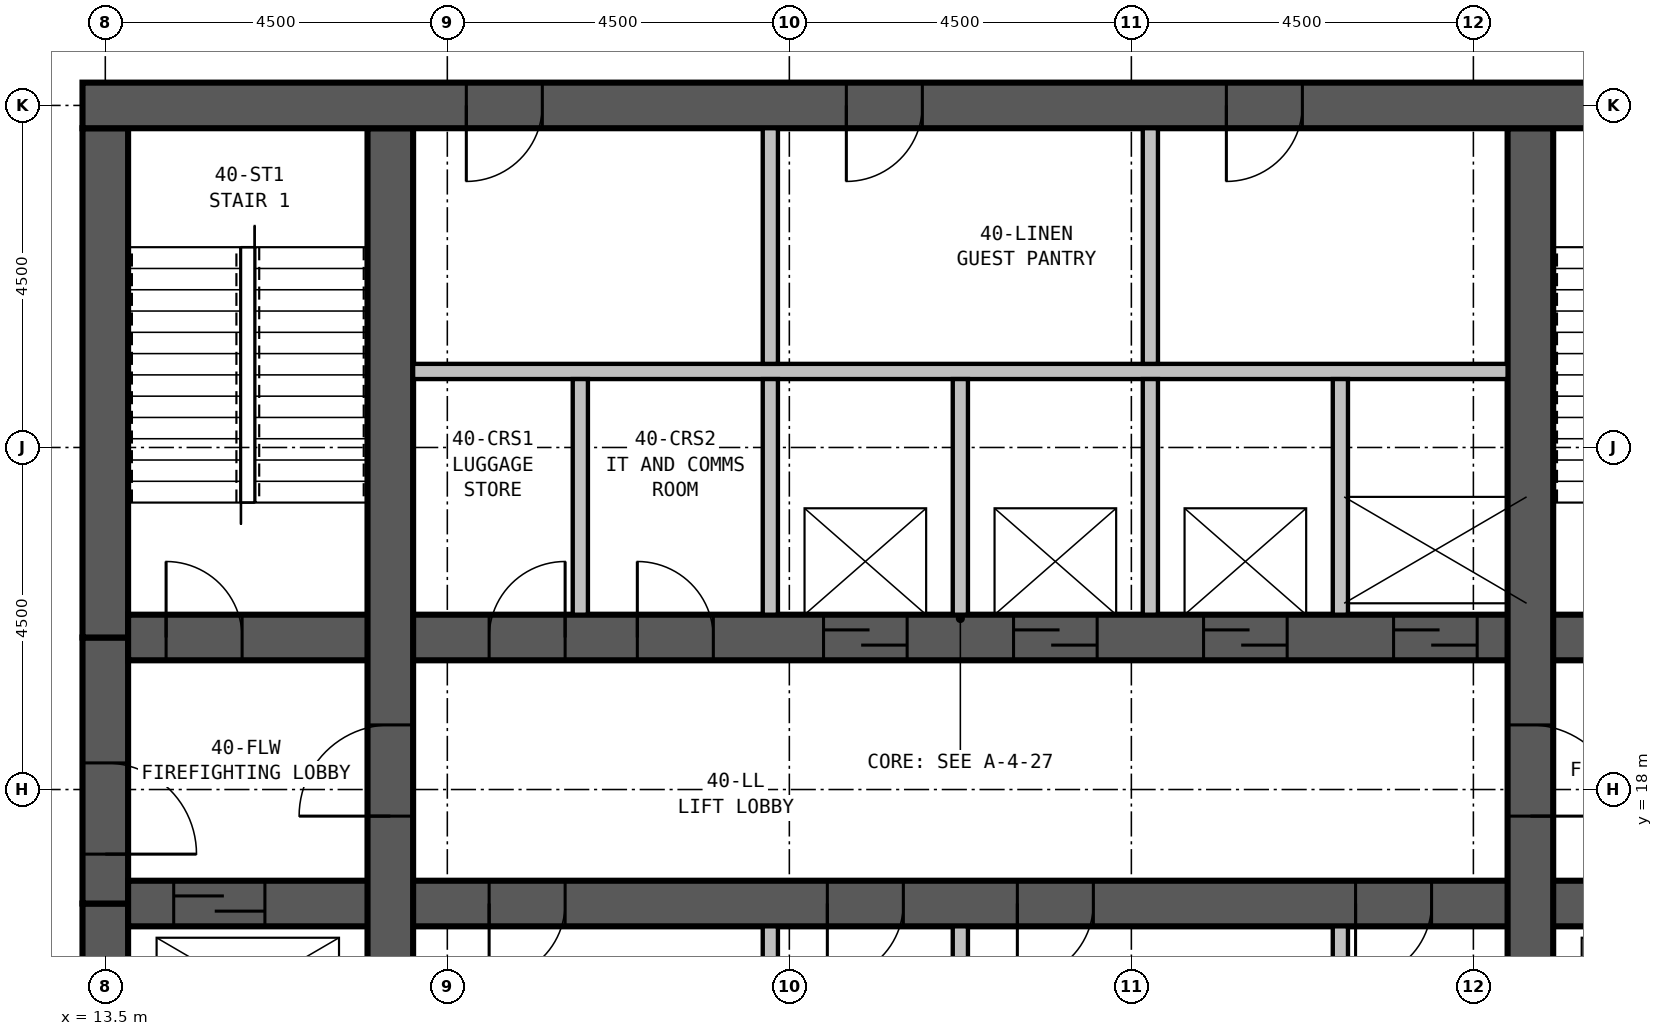
"""IFC4 building model, lengths in metres.
Left out: names, types, materials, properties, quantities, classifications, styles, units other than length and angle.
Written with IfcOpenShell. Run it as: python <this file> out.ifc"""

import sys

from ifc_helpers import new_model, si_unit, direction, frame, frame_2d, origin, place, context, subcontext, project, spatial, rectangle, extrude, element, fill, save


model = new_model("IFC4")
c1 = context("Model", 3, precision=1e-05, world=origin(), true_north=direction((0.0, 1.0)))
c2 = subcontext(c1, "Body", "Model", "MODEL_VIEW")
j1 = project(units=[si_unit("LENGTHUNIT", "METRE"), si_unit("PLANEANGLEUNIT", "RADIAN")], contexts=[c1])
p1 = place(None, origin())
s1 = spatial("IfcSite", under=j1, at=p1, CompositionType="ELEMENT")
p2 = place(p1, origin())
s2 = spatial("IfcBuilding", under=s1, at=p2, CompositionType="ELEMENT")
p3 = place(p2, frame((0.0, 0.0, 157.9)))
s3 = spatial("IfcBuildingStorey", under=s2, at=p3, CompositionType="ELEMENT", Elevation=157.9)
p4 = place(p3, frame((36.3, 27.0, 0.0), z_axis=(0.0, 0.0, 1.0), x_axis=(-1.0, 0.0, 0.0)))
e1 = element("IfcWall", 1, at=p4, inside=s3, PredefinedType="SHEAR", context=c2, shape_type="SweptSolid", body=[
    extrude(rectangle(XDim=23.1, YDim=0.6, at=frame_2d((11.55, 0.0))), origin(), (0.0, 0.0, 1.0), 4.5),
])
p5 = place(p4, frame((17.05, 0.0, 0.0)))
e2 = element("IfcOpeningElement", 2, at=p5, cuts=e1, PredefinedType="OPENING", context=c2, shape_type="SweptSolid", body=[
    extrude(rectangle(XDim=1.0, YDim=2.1, at=frame_2d((0.5, 1.05))), frame((0.0, 0.31, 0.0), z_axis=(0.0, -1.0, 0.0), x_axis=(1.0, 0.0, 0.0)), (0.0, 0.0, 1.0), 0.62),
])
p6 = place(p4, frame((12.05, 0.0, 0.0)))
e3 = element("IfcOpeningElement", 3, at=p6, cuts=e1, PredefinedType="OPENING", context=c2, shape_type="SweptSolid", body=[
    extrude(rectangle(XDim=1.0, YDim=2.1, at=frame_2d((0.5, 1.05))), frame((0.0, 0.31, 0.0), z_axis=(0.0, -1.0, 0.0), x_axis=(1.0, 0.0, 0.0)), (0.0, 0.0, 1.0), 0.62),
])
p7 = place(p4, frame((7.05, 0.0, 0.0)))
e4 = element("IfcOpeningElement", 4, at=p7, cuts=e1, PredefinedType="OPENING", context=c2, shape_type="SweptSolid", body=[
    extrude(rectangle(XDim=1.0, YDim=2.1, at=frame_2d((0.5, 1.05))), frame((0.0, 0.31, 0.0), z_axis=(0.0, -1.0, 0.0), x_axis=(1.0, 0.0, 0.0)), (0.0, 0.0, 1.0), 0.62),
])
p8 = place(p3, frame((17.25, 13.8, 0.0), z_axis=(0.0, 0.0, 1.0), x_axis=(0.0, 1.0, 0.0)))
e5 = element("IfcWall", 5, at=p8, inside=s3, PredefinedType="SHEAR", context=c2, shape_type="SweptSolid", body=[
    extrude(rectangle(XDim=12.9, YDim=0.6, at=frame_2d((6.45, 0.0))), origin(), (0.0, 0.0, 1.0), 4.5),
])
p9 = place(p8, frame((3.85, 0.0, 0.0)))
e6 = element("IfcOpeningElement", 6, at=p9, cuts=e5, PredefinedType="OPENING", context=c2, shape_type="SweptSolid", body=[
    extrude(rectangle(XDim=1.2, YDim=2.1, at=frame_2d((0.6, 1.05))), frame((0.0, 0.31, 0.0), z_axis=(0.0, -1.0, 0.0), x_axis=(1.0, 0.0, 0.0)), (0.0, 0.0, 1.0), 0.62),
])
p10 = place(p3, frame((32.25, 13.8, 0.0), z_axis=(0.0, 0.0, 1.0), x_axis=(0.0, 1.0, 0.0)))
e7 = element("IfcWall", 7, at=p10, inside=s3, PredefinedType="SHEAR", context=c2, shape_type="SweptSolid", body=[
    extrude(rectangle(XDim=12.9, YDim=0.6, at=frame_2d((6.45, 0.0))), origin(), (0.0, 0.0, 1.0), 4.5),
])
p11 = place(p10, frame((5.05, 0.0, 0.0), z_axis=(0.0, 0.0, 1.0), x_axis=(-1.0, 0.0, 0.0)))
e8 = element("IfcOpeningElement", 8, at=p11, cuts=e7, PredefinedType="OPENING", context=c2, shape_type="SweptSolid", body=[
    extrude(rectangle(XDim=1.2, YDim=2.1, at=frame_2d((0.6, 1.05))), frame((0.0, 0.31, 0.0), z_axis=(0.0, -1.0, 0.0), x_axis=(1.0, 0.0, 0.0)), (0.0, 0.0, 1.0), 0.62),
])
p12 = place(p3, frame((13.8, 16.5, 0.0), z_axis=(0.0, 0.0, 1.0), x_axis=(1.0, 0.0, 0.0)))
e9 = element("IfcWall", 9, at=p12, inside=s3, PredefinedType="SHEAR", context=c2, shape_type="SweptSolid", body=[
    extrude(rectangle(XDim=21.9, YDim=0.6, at=frame_2d((10.95, 0.0))), origin(), (0.0, 0.0, 1.0), 4.5),
])
p13 = place(p12, frame((5.75, 0.0, 0.0), z_axis=(0.0, 0.0, 1.0), x_axis=(-1.0, 0.0, 0.0)))
e10 = element("IfcOpeningElement", 10, at=p13, cuts=e9, PredefinedType="OPENING", context=c2, shape_type="SweptSolid", body=[
    extrude(rectangle(XDim=1.0, YDim=2.1, at=frame_2d((0.5, 1.05))), frame((0.0, 0.31, 0.0), z_axis=(0.0, -1.0, 0.0), x_axis=(1.0, 0.0, 0.0)), (0.0, 0.0, 1.0), 0.62),
])
p14 = place(p12, frame((10.2, 0.0, 0.0), z_axis=(0.0, 0.0, 1.0), x_axis=(-1.0, 0.0, 0.0)))
e11 = element("IfcOpeningElement", 11, at=p14, cuts=e9, PredefinedType="OPENING", context=c2, shape_type="SweptSolid", body=[
    extrude(rectangle(XDim=1.0, YDim=2.1, at=frame_2d((0.5, 1.05))), frame((0.0, 0.31, 0.0), z_axis=(0.0, -1.0, 0.0), x_axis=(1.0, 0.0, 0.0)), (0.0, 0.0, 1.0), 0.62),
])
p15 = place(p12, frame((12.7, 0.0, 0.0), z_axis=(0.0, 0.0, 1.0), x_axis=(-1.0, 0.0, 0.0)))
e12 = element("IfcOpeningElement", 12, at=p15, cuts=e9, PredefinedType="OPENING", context=c2, shape_type="SweptSolid", body=[
    extrude(rectangle(XDim=1.0, YDim=2.1, at=frame_2d((0.5, 1.05))), frame((0.0, 0.31, 0.0), z_axis=(0.0, -1.0, 0.0), x_axis=(1.0, 0.0, 0.0)), (0.0, 0.0, 1.0), 0.62),
])
p16 = place(p12, frame((17.15, 0.0, 0.0), z_axis=(0.0, 0.0, 1.0), x_axis=(-1.0, 0.0, 0.0)))
e13 = element("IfcOpeningElement", 13, at=p16, cuts=e9, PredefinedType="OPENING", context=c2, shape_type="SweptSolid", body=[
    extrude(rectangle(XDim=1.0, YDim=2.1, at=frame_2d((0.5, 1.05))), frame((0.0, 0.31, 0.0), z_axis=(0.0, -1.0, 0.0), x_axis=(1.0, 0.0, 0.0)), (0.0, 0.0, 1.0), 0.62),
])
p17 = place(p12, frame((0.6, 0.0, 0.0)))
e14 = element("IfcOpeningElement", 14, at=p17, cuts=e9, PredefinedType="OPENING", context=c2, shape_type="SweptSolid", body=[
    extrude(rectangle(XDim=1.2, YDim=2.1, at=frame_2d((0.6, 1.05))), frame((0.0, 0.31, 0.0), z_axis=(0.0, -1.0, 0.0), x_axis=(1.0, 0.0, 0.0)), (0.0, 0.0, 1.0), 0.62),
])
p18 = place(p12, frame((19.6, 0.0, 0.0)))
e15 = element("IfcOpeningElement", 15, at=p18, cuts=e9, PredefinedType="OPENING", context=c2, shape_type="SweptSolid", body=[
    extrude(rectangle(XDim=1.2, YDim=2.1, at=frame_2d((0.6, 1.05))), frame((0.0, 0.31, 0.0), z_axis=(0.0, -1.0, 0.0), x_axis=(1.0, 0.0, 0.0)), (0.0, 0.0, 1.0), 0.62),
])
p19 = place(p3, frame((13.8, 20.0, 0.0), z_axis=(0.0, 0.0, 1.0), x_axis=(1.0, 0.0, 0.0)))
e16 = element("IfcWall", 16, at=p19, inside=s3, PredefinedType="SHEAR", context=c2, shape_type="SweptSolid", body=[
    extrude(rectangle(XDim=21.9, YDim=0.6, at=frame_2d((10.95, 0.0))), origin(), (0.0, 0.0, 1.0), 4.5),
])
p20 = place(p19, frame((0.5, 0.0, 0.0)))
e17 = element("IfcOpeningElement", 17, at=p20, cuts=e16, PredefinedType="OPENING", context=c2, shape_type="SweptSolid", body=[
    extrude(rectangle(XDim=1.0, YDim=2.1, at=frame_2d((0.5, 1.05))), frame((0.0, 0.31, 0.0), z_axis=(0.0, -1.0, 0.0), x_axis=(1.0, 0.0, 0.0)), (0.0, 0.0, 1.0), 0.62),
])
p21 = place(p19, frame((20.5, 0.0, 0.0)))
e18 = element("IfcOpeningElement", 18, at=p21, cuts=e16, PredefinedType="OPENING", context=c2, shape_type="SweptSolid", body=[
    extrude(rectangle(XDim=1.0, YDim=2.1, at=frame_2d((0.5, 1.05))), frame((0.0, 0.31, 0.0), z_axis=(0.0, -1.0, 0.0), x_axis=(1.0, 0.0, 0.0)), (0.0, 0.0, 1.0), 0.62),
])
p22 = place(p19, frame((9.15, 0.0, 0.0)))
e19 = element("IfcOpeningElement", 19, at=p22, cuts=e16, PredefinedType="OPENING", context=c2, shape_type="SweptSolid", body=[
    extrude(rectangle(XDim=1.1, YDim=2.1, at=frame_2d((0.55, 1.05))), frame((0.0, 0.31, 0.0), z_axis=(0.0, -1.0, 0.0), x_axis=(1.0, 0.0, 0.0)), (0.0, 0.0, 1.0), 0.62),
])
p23 = place(p19, frame((11.65, 0.0, 0.0)))
e20 = element("IfcOpeningElement", 20, at=p23, cuts=e16, PredefinedType="OPENING", context=c2, shape_type="SweptSolid", body=[
    extrude(rectangle(XDim=1.1, YDim=2.1, at=frame_2d((0.55, 1.05))), frame((0.0, 0.31, 0.0), z_axis=(0.0, -1.0, 0.0), x_axis=(1.0, 0.0, 0.0)), (0.0, 0.0, 1.0), 0.62),
])
p24 = place(p19, frame((14.15, 0.0, 0.0)))
e21 = element("IfcOpeningElement", 21, at=p24, cuts=e16, PredefinedType="OPENING", context=c2, shape_type="SweptSolid", body=[
    extrude(rectangle(XDim=1.1, YDim=2.1, at=frame_2d((0.55, 1.05))), frame((0.0, 0.31, 0.0), z_axis=(0.0, -1.0, 0.0), x_axis=(1.0, 0.0, 0.0)), (0.0, 0.0, 1.0), 0.62),
])
p25 = place(p19, frame((16.65, 0.0, 0.0)))
e22 = element("IfcOpeningElement", 22, at=p25, cuts=e16, PredefinedType="OPENING", context=c2, shape_type="SweptSolid", body=[
    extrude(rectangle(XDim=1.1, YDim=2.1, at=frame_2d((0.55, 1.05))), frame((0.0, 0.31, 0.0), z_axis=(0.0, -1.0, 0.0), x_axis=(1.0, 0.0, 0.0)), (0.0, 0.0, 1.0), 0.62),
])
p26 = place(p19, frame((4.75, 0.0, 0.0)))
e23 = element("IfcOpeningElement", 23, at=p26, cuts=e16, PredefinedType="OPENING", context=c2, shape_type="SweptSolid", body=[
    extrude(rectangle(XDim=1.0, YDim=2.1, at=frame_2d((0.5, 1.05))), frame((0.0, 0.31, 0.0), z_axis=(0.0, -1.0, 0.0), x_axis=(1.0, 0.0, 0.0)), (0.0, 0.0, 1.0), 0.62),
])
p27 = place(p19, frame((6.7, 0.0, 0.0)))
e24 = element("IfcOpeningElement", 24, at=p27, cuts=e16, PredefinedType="OPENING", context=c2, shape_type="SweptSolid", body=[
    extrude(rectangle(XDim=1.0, YDim=2.1, at=frame_2d((0.5, 1.05))), frame((0.0, 0.31, 0.0), z_axis=(0.0, -1.0, 0.0), x_axis=(1.0, 0.0, 0.0)), (0.0, 0.0, 1.0), 0.62),
])
p28 = place(p3, frame((13.5, 26.7, 0.0), z_axis=(0.0, 0.0, 1.0), x_axis=(0.0, -1.0, 0.0)))
e25 = element("IfcWall", 25, at=p28, inside=s3, PredefinedType="SHEAR", context=c2, shape_type="SweptSolid", body=[
    extrude(rectangle(XDim=6.7, YDim=0.6, at=frame_2d((3.35, 0.0))), origin(), (0.0, 0.0, 1.0), 4.5),
])
p29 = place(p3, frame((13.5, 20.0, 0.0), z_axis=(0.0, 0.0, 1.0), x_axis=(0.0, -1.0, 0.0)))
e26 = element("IfcWall", 26, at=p29, inside=s3, PredefinedType="SHEAR", context=c2, shape_type="SweptSolid", body=[
    extrude(rectangle(XDim=3.5, YDim=0.6, at=frame_2d((1.75, 0.0))), origin(), (0.0, 0.0, 1.0), 4.5),
])
p30 = place(p29, frame((1.65, 0.0, 0.0)))
e27 = element("IfcOpeningElement", 27, at=p30, cuts=e26, PredefinedType="OPENING", context=c2, shape_type="SweptSolid", body=[
    extrude(rectangle(XDim=1.2, YDim=2.1, at=frame_2d((0.6, 1.05))), frame((0.0, 0.31, 0.0), z_axis=(0.0, -1.0, 0.0), x_axis=(1.0, 0.0, 0.0)), (0.0, 0.0, 1.0), 0.62),
])
p31 = place(p3, frame((13.5, 16.5, 0.0), z_axis=(0.0, 0.0, 1.0), x_axis=(0.0, -1.0, 0.0)))
e28 = element("IfcWall", 28, at=p31, inside=s3, PredefinedType="SHEAR", context=c2, shape_type="SweptSolid", body=[
    extrude(rectangle(XDim=2.7, YDim=0.6, at=frame_2d((1.35, 0.0))), origin(), (0.0, 0.0, 1.0), 4.5),
])
p32 = place(p3, frame((19.75, 20.3, 0.0), z_axis=(0.0, 0.0, 1.0), x_axis=(0.0, 1.0, 0.0)))
e29 = element("IfcWall", 29, at=p32, inside=s3, PredefinedType="PARTITIONING", context=c2, shape_type="SweptSolid", body=[
    extrude(rectangle(XDim=3.1, YDim=0.2, at=frame_2d((1.55, 0.0))), origin(), (0.0, 0.0, 1.0), 4.25),
])
p33 = place(p3, frame((22.25, 13.8, 0.0), z_axis=(0.0, 0.0, 1.0), x_axis=(0.0, 1.0, 0.0)))
e30 = element("IfcWall", 30, at=p33, inside=s3, PredefinedType="PARTITIONING", context=c2, shape_type="SweptSolid", body=[
    extrude(rectangle(XDim=2.4, YDim=0.2, at=frame_2d((1.2, 0.0))), origin(), (0.0, 0.0, 1.0), 4.25),
])
p34 = place(p3, frame((22.25, 20.3, 0.0), z_axis=(0.0, 0.0, 1.0), x_axis=(0.0, 1.0, 0.0)))
e31 = element("IfcWall", 31, at=p34, inside=s3, PredefinedType="PARTITIONING", context=c2, shape_type="SweptSolid", body=[
    extrude(rectangle(XDim=3.1, YDim=0.2, at=frame_2d((1.55, 0.0))), origin(), (0.0, 0.0, 1.0), 4.25),
])
p35 = place(p3, frame((24.75, 13.8, 0.0), z_axis=(0.0, 0.0, 1.0), x_axis=(0.0, 1.0, 0.0)))
e32 = element("IfcWall", 32, at=p35, inside=s3, PredefinedType="PARTITIONING", context=c2, shape_type="SweptSolid", body=[
    extrude(rectangle(XDim=2.4, YDim=0.2, at=frame_2d((1.2, 0.0))), origin(), (0.0, 0.0, 1.0), 4.25),
])
for number, where, z_axis, x_axis in (
    (33, (24.75, 20.3, 0.0), (0.0, 0.0, 1.0), (0.0, 1.0, 0.0)),
    (34, (27.25, 20.3, 0.0), (0.0, 0.0, 1.0), (0.0, 1.0, 0.0)),
):
    element("IfcWall", number, at=place(p3, frame(where, z_axis=z_axis, x_axis=x_axis)), inside=s3, PredefinedType="PARTITIONING", context=c2, shape_type="SweptSolid", body=[
        extrude(rectangle(XDim=3.1, YDim=0.2, at=frame_2d((1.55, 0.0))), origin(), (0.0, 0.0, 1.0), 4.25),
    ])
p36 = place(p3, frame((29.75, 13.8, 0.0), z_axis=(0.0, 0.0, 1.0), x_axis=(0.0, 1.0, 0.0)))
e35 = element("IfcWall", 35, at=p36, inside=s3, PredefinedType="PARTITIONING", context=c2, shape_type="SweptSolid", body=[
    extrude(rectangle(XDim=2.4, YDim=0.2, at=frame_2d((1.2, 0.0))), origin(), (0.0, 0.0, 1.0), 4.25),
])
p37 = place(p3, frame((29.75, 20.3, 0.0), z_axis=(0.0, 0.0, 1.0), x_axis=(0.0, 1.0, 0.0)))
e36 = element("IfcWall", 36, at=p37, inside=s3, PredefinedType="PARTITIONING", context=c2, shape_type="SweptSolid", body=[
    extrude(rectangle(XDim=3.1, YDim=0.2, at=frame_2d((1.55, 0.0))), origin(), (0.0, 0.0, 1.0), 4.25),
])
p38 = place(p3, frame((17.55, 23.5, 0.0), z_axis=(0.0, 0.0, 1.0), x_axis=(1.0, 0.0, 0.0)))
e37 = element("IfcWall", 37, at=p38, inside=s3, PredefinedType="PARTITIONING", context=c2, shape_type="SweptSolid", body=[
    extrude(rectangle(XDim=14.4, YDim=0.2, at=frame_2d((7.2, 0.0))), origin(), (0.0, 0.0, 1.0), 4.25),
])
for number, where, z_axis, x_axis in (
    (38, (22.25, 23.6, 0.0), (0.0, 0.0, 1.0), (0.0, 1.0, 0.0)),
    (39, (27.25, 23.6, 0.0), (0.0, 0.0, 1.0), (0.0, 1.0, 0.0)),
):
    element("IfcWall", number, at=place(p3, frame(where, z_axis=z_axis, x_axis=x_axis)), inside=s3, PredefinedType="PARTITIONING", context=c2, shape_type="SweptSolid", body=[
        extrude(rectangle(XDim=3.1, YDim=0.2, at=frame_2d((1.55, 0.0))), origin(), (0.0, 0.0, 1.0), 4.25),
    ])
p39 = place(p30, origin())
e40 = element("IfcDoor", 40, at=p39, inside=s3, OperationType="SINGLE_SWING_RIGHT", PredefinedType="DOOR", context=c2, shape_type="SweptSolid", body=[
    extrude(rectangle(XDim=1.2, YDim=2.1, at=frame_2d((0.6, 1.05))), frame((0.0, 0.3, 0.0), z_axis=(0.0, -1.0, 0.0), x_axis=(1.0, 0.0, 0.0)), (0.0, 0.0, 1.0), 0.6),
])
fill(e27, e40)
p40 = place(p9, origin())
e41 = element("IfcDoor", 41, at=p40, inside=s3, OperationType="SINGLE_SWING_LEFT", PredefinedType="DOOR", context=c2, shape_type="SweptSolid", body=[
    extrude(rectangle(XDim=1.2, YDim=2.1, at=frame_2d((0.6, 1.05))), frame((0.0, 0.3, 0.0), z_axis=(0.0, -1.0, 0.0), x_axis=(1.0, 0.0, 0.0)), (0.0, 0.0, 1.0), 0.6),
])
fill(e6, e41)
p41 = place(p11, origin())
e42 = element("IfcDoor", 42, at=p41, inside=s3, OperationType="SINGLE_SWING_RIGHT", PredefinedType="DOOR", context=c2, shape_type="SweptSolid", body=[
    extrude(rectangle(XDim=1.2, YDim=2.1, at=frame_2d((0.6, 1.05))), frame((0.0, 0.3, 0.0), z_axis=(0.0, -1.0, 0.0), x_axis=(1.0, 0.0, 0.0)), (0.0, 0.0, 1.0), 0.6),
])
fill(e8, e42)
p42 = place(p20, origin())
e43 = element("IfcDoor", 43, at=p42, inside=s3, OperationType="SINGLE_SWING_LEFT", PredefinedType="DOOR", context=c2, shape_type="SweptSolid", body=[
    extrude(rectangle(XDim=1.0, YDim=2.1, at=frame_2d((0.5, 1.05))), frame((0.0, 0.3, 0.0), z_axis=(0.0, -1.0, 0.0), x_axis=(1.0, 0.0, 0.0)), (0.0, 0.0, 1.0), 0.6),
])
fill(e17, e43)
p43 = place(p22, origin())
e44 = element("IfcDoor", 44, at=p43, inside=s3, OperationType="SLIDING_TO_LEFT", PredefinedType="DOOR", context=c2, shape_type="SweptSolid", body=[
    extrude(rectangle(XDim=1.1, YDim=2.1, at=frame_2d((0.55, 1.05))), frame((0.0, 0.3, 0.0), z_axis=(0.0, -1.0, 0.0), x_axis=(1.0, 0.0, 0.0)), (0.0, 0.0, 1.0), 0.6),
])
fill(e19, e44)
p44 = place(p23, origin())
e45 = element("IfcDoor", 45, at=p44, inside=s3, OperationType="SLIDING_TO_LEFT", PredefinedType="DOOR", context=c2, shape_type="SweptSolid", body=[
    extrude(rectangle(XDim=1.1, YDim=2.1, at=frame_2d((0.55, 1.05))), frame((0.0, 0.3, 0.0), z_axis=(0.0, -1.0, 0.0), x_axis=(1.0, 0.0, 0.0)), (0.0, 0.0, 1.0), 0.6),
])
fill(e20, e45)
p45 = place(p24, origin())
e46 = element("IfcDoor", 46, at=p45, inside=s3, OperationType="SLIDING_TO_LEFT", PredefinedType="DOOR", context=c2, shape_type="SweptSolid", body=[
    extrude(rectangle(XDim=1.1, YDim=2.1, at=frame_2d((0.55, 1.05))), frame((0.0, 0.3, 0.0), z_axis=(0.0, -1.0, 0.0), x_axis=(1.0, 0.0, 0.0)), (0.0, 0.0, 1.0), 0.6),
])
fill(e21, e46)
p46 = place(p25, origin())
e47 = element("IfcDoor", 47, at=p46, inside=s3, OperationType="SLIDING_TO_LEFT", PredefinedType="DOOR", context=c2, shape_type="SweptSolid", body=[
    extrude(rectangle(XDim=1.1, YDim=2.1, at=frame_2d((0.55, 1.05))), frame((0.0, 0.3, 0.0), z_axis=(0.0, -1.0, 0.0), x_axis=(1.0, 0.0, 0.0)), (0.0, 0.0, 1.0), 0.6),
])
fill(e22, e47)
p47 = place(p13, origin())
e48 = element("IfcDoor", 48, at=p47, inside=s3, OperationType="SINGLE_SWING_RIGHT", PredefinedType="DOOR", context=c2, shape_type="SweptSolid", body=[
    extrude(rectangle(XDim=1.0, YDim=2.1, at=frame_2d((0.5, 1.05))), frame((0.0, 0.3, 0.0), z_axis=(0.0, -1.0, 0.0), x_axis=(1.0, 0.0, 0.0)), (0.0, 0.0, 1.0), 0.6),
])
fill(e10, e48)
p48 = place(p14, origin())
e49 = element("IfcDoor", 49, at=p48, inside=s3, OperationType="SINGLE_SWING_RIGHT", PredefinedType="DOOR", context=c2, shape_type="SweptSolid", body=[
    extrude(rectangle(XDim=1.0, YDim=2.1, at=frame_2d((0.5, 1.05))), frame((0.0, 0.3, 0.0), z_axis=(0.0, -1.0, 0.0), x_axis=(1.0, 0.0, 0.0)), (0.0, 0.0, 1.0), 0.6),
])
fill(e11, e49)
p49 = place(p15, origin())
e50 = element("IfcDoor", 50, at=p49, inside=s3, OperationType="SINGLE_SWING_RIGHT", PredefinedType="DOOR", context=c2, shape_type="SweptSolid", body=[
    extrude(rectangle(XDim=1.0, YDim=2.1, at=frame_2d((0.5, 1.05))), frame((0.0, 0.3, 0.0), z_axis=(0.0, -1.0, 0.0), x_axis=(1.0, 0.0, 0.0)), (0.0, 0.0, 1.0), 0.6),
])
fill(e12, e50)
p50 = place(p16, origin())
e51 = element("IfcDoor", 51, at=p50, inside=s3, OperationType="SINGLE_SWING_RIGHT", PredefinedType="DOOR", context=c2, shape_type="SweptSolid", body=[
    extrude(rectangle(XDim=1.0, YDim=2.1, at=frame_2d((0.5, 1.05))), frame((0.0, 0.3, 0.0), z_axis=(0.0, -1.0, 0.0), x_axis=(1.0, 0.0, 0.0)), (0.0, 0.0, 1.0), 0.6),
])
fill(e13, e51)
p51 = place(p26, origin())
e52 = element("IfcDoor", 52, at=p51, inside=s3, OperationType="SINGLE_SWING_RIGHT", PredefinedType="DOOR", context=c2, shape_type="SweptSolid", body=[
    extrude(rectangle(XDim=1.0, YDim=2.1, at=frame_2d((0.5, 1.05))), frame((0.0, 0.3, 0.0), z_axis=(0.0, -1.0, 0.0), x_axis=(1.0, 0.0, 0.0)), (0.0, 0.0, 1.0), 0.6),
])
fill(e23, e52)
p52 = place(p27, origin())
e53 = element("IfcDoor", 53, at=p52, inside=s3, OperationType="SINGLE_SWING_LEFT", PredefinedType="DOOR", context=c2, shape_type="SweptSolid", body=[
    extrude(rectangle(XDim=1.0, YDim=2.1, at=frame_2d((0.5, 1.05))), frame((0.0, 0.3, 0.0), z_axis=(0.0, -1.0, 0.0), x_axis=(1.0, 0.0, 0.0)), (0.0, 0.0, 1.0), 0.6),
])
fill(e24, e53)
p53 = place(p17, origin())
e54 = element("IfcDoor", 54, at=p53, inside=s3, OperationType="SLIDING_TO_LEFT", PredefinedType="DOOR", context=c2, shape_type="SweptSolid", body=[
    extrude(rectangle(XDim=1.2, YDim=2.1, at=frame_2d((0.6, 1.05))), frame((0.0, 0.3, 0.0), z_axis=(0.0, -1.0, 0.0), x_axis=(1.0, 0.0, 0.0)), (0.0, 0.0, 1.0), 0.6),
])
fill(e14, e54)
p54 = place(p5, origin())
e55 = element("IfcDoor", 55, at=p54, inside=s3, OperationType="SINGLE_SWING_RIGHT", PredefinedType="DOOR", context=c2, shape_type="SweptSolid", body=[
    extrude(rectangle(XDim=1.0, YDim=2.1, at=frame_2d((0.5, 1.05))), frame((0.0, 0.3, 0.0), z_axis=(0.0, -1.0, 0.0), x_axis=(1.0, 0.0, 0.0)), (0.0, 0.0, 1.0), 0.6),
])
fill(e2, e55)
p55 = place(p6, origin())
e56 = element("IfcDoor", 56, at=p55, inside=s3, OperationType="SINGLE_SWING_RIGHT", PredefinedType="DOOR", context=c2, shape_type="SweptSolid", body=[
    extrude(rectangle(XDim=1.0, YDim=2.1, at=frame_2d((0.5, 1.05))), frame((0.0, 0.3, 0.0), z_axis=(0.0, -1.0, 0.0), x_axis=(1.0, 0.0, 0.0)), (0.0, 0.0, 1.0), 0.6),
])
fill(e3, e56)
p56 = place(p7, origin())
e57 = element("IfcDoor", 57, at=p56, inside=s3, OperationType="SINGLE_SWING_RIGHT", PredefinedType="DOOR", context=c2, shape_type="SweptSolid", body=[
    extrude(rectangle(XDim=1.0, YDim=2.1, at=frame_2d((0.5, 1.05))), frame((0.0, 0.3, 0.0), z_axis=(0.0, -1.0, 0.0), x_axis=(1.0, 0.0, 0.0)), (0.0, 0.0, 1.0), 0.6),
])
fill(e4, e57)
save(model, sys.argv[1])
